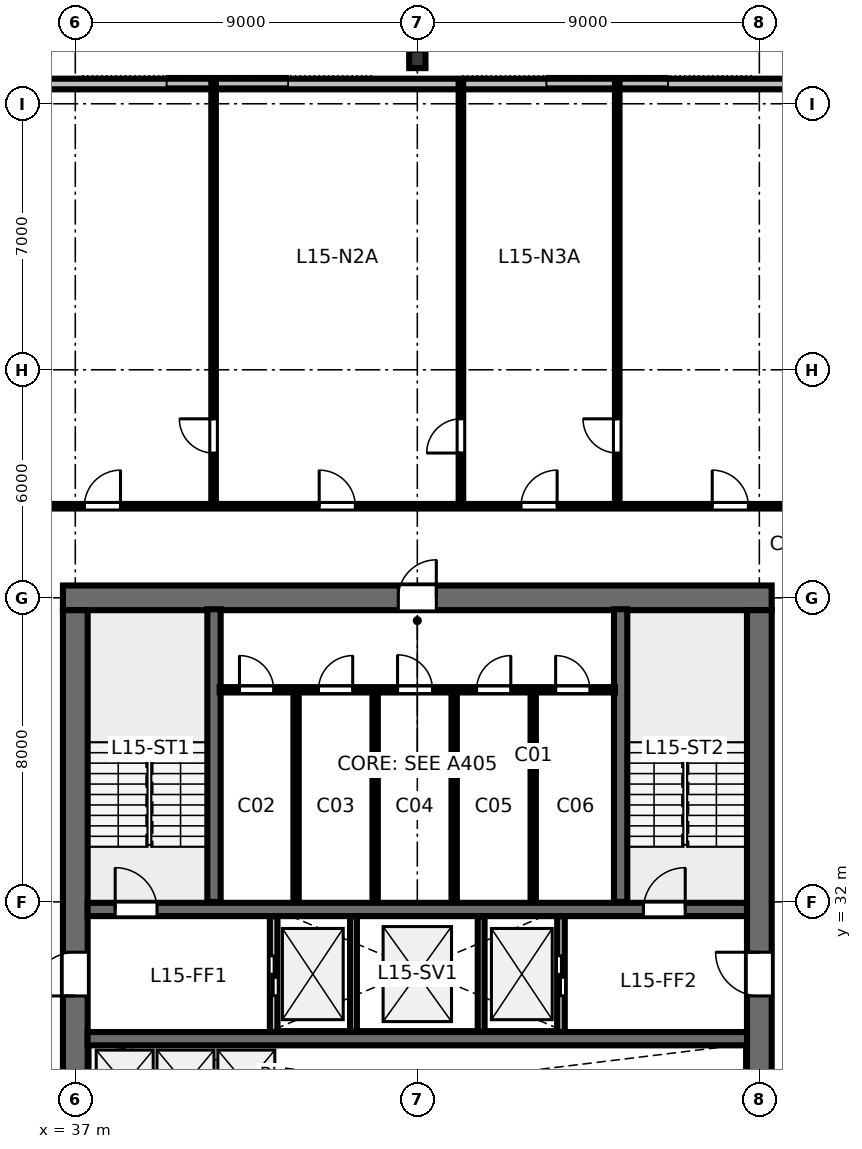
"""IFC4 building model, lengths in metres.
Left out: names, types, materials, properties, quantities, classifications, styles, units other than length and angle.
Written with IfcOpenShell. Run it as: python <this file> out.ifc"""

import sys

from ifc_helpers import new_model, si_unit, direction, frame, frame_2d, origin, origin_2d, place, context, subcontext, project, spatial, rectangle, i_section, extrude, element, fill, save


model = new_model("IFC4")
c1 = context("Model", 3, precision=1e-05, world=origin(), true_north=direction((0.0, 1.0)))
c2 = subcontext(c1, "Body", "Model", "MODEL_VIEW")
j1 = project(units=[si_unit("LENGTHUNIT", "METRE"), si_unit("PLANEANGLEUNIT", "RADIAN")], contexts=[c1])
p1 = place(None, origin())
s1 = spatial("IfcSite", under=j1, at=p1, CompositionType="ELEMENT")
p2 = place(p1, origin())
s2 = spatial("IfcBuilding", under=s1, at=p2, CompositionType="ELEMENT")
p3 = place(p2, frame((0.0, 0.0, 60.4)))
s3 = spatial("IfcBuildingStorey", under=s2, at=p3, CompositionType="ELEMENT", Elevation=60.4)
p4 = place(p3, frame((36.675, 40.0, 0.0), z_axis=(0.0, 0.0, 1.0), x_axis=(1.0, 0.0, 0.0)))
e1 = element("IfcWall", 1, at=p4, inside=s3, PredefinedType="SHEAR", context=c2, shape_type="SweptSolid", body=[
    extrude(rectangle(XDim=18.65, YDim=0.65, at=frame_2d((9.325, 0.0))), origin(), (0.0, 0.0, 1.0), 3.36),
])
p5 = place(p4, frame((8.825, 0.0, 0.0)))
e2 = element("IfcOpeningElement", 2, at=p5, cuts=e1, PredefinedType="OPENING", context=c2, shape_type="SweptSolid", body=[
    extrude(rectangle(XDim=1.0, YDim=2.15, at=frame_2d((0.5, 1.075))), frame((0.0, 0.335, 0.0), z_axis=(0.0, -1.0, 0.0), x_axis=(1.0, 0.0, 0.0)), (0.0, 0.0, 1.0), 0.67),
])
p6 = place(p3, frame((37.0, 24.325, 0.0), z_axis=(0.0, 0.0, 1.0), x_axis=(0.0, 1.0, 0.0)))
e3 = element("IfcWall", 3, at=p6, inside=s3, PredefinedType="SHEAR", context=c2, shape_type="SweptSolid", body=[
    extrude(rectangle(XDim=15.35, YDim=0.65, at=frame_2d((7.675, 0.0))), origin(), (0.0, 0.0, 1.0), 3.36),
])
p7 = place(p6, frame((5.2, 0.0, 0.0)))
e4 = element("IfcOpeningElement", 4, at=p7, cuts=e3, PredefinedType="OPENING", context=c2, shape_type="SweptSolid", body=[
    extrude(rectangle(XDim=1.15, YDim=2.15, at=frame_2d((0.575, 1.075))), frame((0.0, 0.335, 0.0), z_axis=(0.0, -1.0, 0.0), x_axis=(1.0, 0.0, 0.0)), (0.0, 0.0, 1.0), 0.67),
])
p8 = place(p3, frame((55.0, 24.325, 0.0), z_axis=(0.0, 0.0, 1.0), x_axis=(0.0, 1.0, 0.0)))
e5 = element("IfcWall", 5, at=p8, inside=s3, PredefinedType="SHEAR", context=c2, shape_type="SweptSolid", body=[
    extrude(rectangle(XDim=15.35, YDim=0.65, at=frame_2d((7.675, 0.0))), origin(), (0.0, 0.0, 1.0), 3.36),
])
p9 = place(p8, frame((5.2, 0.0, 0.0)))
e6 = element("IfcOpeningElement", 6, at=p9, cuts=e5, PredefinedType="OPENING", context=c2, shape_type="SweptSolid", body=[
    extrude(rectangle(XDim=1.15, YDim=2.15, at=frame_2d((0.575, 1.075))), frame((0.0, 0.335, 0.0), z_axis=(0.0, -1.0, 0.0), x_axis=(1.0, 0.0, 0.0)), (0.0, 0.0, 1.0), 0.67),
])
p10 = place(p3, frame((37.325, 31.8, 0.0), z_axis=(0.0, 0.0, 1.0), x_axis=(1.0, 0.0, 0.0)))
e7 = element("IfcWall", 7, at=p10, inside=s3, PredefinedType="SHEAR", context=c2, shape_type="SweptSolid", body=[
    extrude(rectangle(XDim=17.35, YDim=0.35, at=frame_2d((8.675, 0.0))), origin(), (0.0, 0.0, 1.0), 3.36),
])
p11 = place(p10, frame((0.725, 0.0, 0.0)))
e8 = element("IfcOpeningElement", 8, at=p11, cuts=e7, PredefinedType="OPENING", context=c2, shape_type="SweptSolid", body=[
    extrude(rectangle(XDim=1.1, YDim=2.15, at=frame_2d((0.55, 1.075))), frame((0.0, 0.185, 0.0), z_axis=(0.0, -1.0, 0.0), x_axis=(1.0, 0.0, 0.0)), (0.0, 0.0, 1.0), 0.37),
])
p12 = place(p10, frame((14.625, 0.0, 0.0)))
e9 = element("IfcOpeningElement", 9, at=p12, cuts=e7, PredefinedType="OPENING", context=c2, shape_type="SweptSolid", body=[
    extrude(rectangle(XDim=1.1, YDim=2.15, at=frame_2d((0.55, 1.075))), frame((0.0, 0.185, 0.0), z_axis=(0.0, -1.0, 0.0), x_axis=(1.0, 0.0, 0.0)), (0.0, 0.0, 1.0), 0.37),
])
p13 = place(p3, frame((37.325, 28.4, 0.0), z_axis=(0.0, 0.0, 1.0), x_axis=(1.0, 0.0, 0.0)))
e10 = element("IfcWall", 10, at=p13, inside=s3, PredefinedType="SHEAR", context=c2, shape_type="SweptSolid", body=[
    extrude(rectangle(XDim=17.35, YDim=0.35, at=frame_2d((8.675, 0.0))), origin(), (0.0, 0.0, 1.0), 3.36),
])
p14 = place(p3, frame((46.0, 54.18, 0.0), z_axis=(0.0, 0.0, 1.0), x_axis=(1.0, 0.0, 0.0)))
e11 = element("IfcColumn", 11, at=p14, inside=s3, PredefinedType="COLUMN", context=c2, shape_type="SweptSolid", body=[
    extrude(i_section(OverallWidth=0.428, OverallDepth=0.483, WebThickness=0.051, FlangeThickness=0.082, FilletRadius=0.025, at=origin_2d()), origin(), (0.0, 0.0, 1.0), 3.358),
])
p15 = place(p3, frame((66.89, 53.52, 0.0), z_axis=(0.0, 0.0, 1.0), x_axis=(-1.0, 0.0, 0.0)))
e12 = element("IfcWall", 12, at=p15, inside=s3, PredefinedType="STANDARD", context=c2, shape_type="SweptSolid", body=[
    extrude(rectangle(XDim=41.78, YDim=0.28, at=frame_2d((20.89, 0.0))), origin(), (0.0, 0.0, 1.0), 3.36),
])
for number, where, z_axis, x_axis in (
    (13, (40.65, 32.0, 0.0), (0.0, 0.0, 1.0), (0.0, 1.0, 0.0)),
    (14, (51.35, 32.0, 0.0), (0.0, 0.0, 1.0), (0.0, 1.0, 0.0)),
):
    element("IfcWall", number, at=place(p3, frame(where, z_axis=z_axis, x_axis=x_axis)), inside=s3, PredefinedType="SHEAR", context=c2, shape_type="SweptSolid", body=[
        extrude(rectangle(XDim=7.7, YDim=0.35, at=frame_2d((3.85, 0.0))), origin(), (0.0, 0.0, 1.0), 3.6),
    ])
for number, where, z_axis, x_axis in (
    (15, (42.81, 32.05, 0.0), (0.0, 0.0, 1.0), (0.0, 1.0, 0.0)),
    (16, (44.89, 32.05, 0.0), (0.0, 0.0, 1.0), (0.0, 1.0, 0.0)),
    (17, (46.97, 32.05, 0.0), (0.0, 0.0, 1.0), (0.0, 1.0, 0.0)),
    (18, (49.05, 32.05, 0.0), (0.0, 0.0, 1.0), (0.0, 1.0, 0.0)),
):
    element("IfcWall", number, at=place(p3, frame(where, z_axis=z_axis, x_axis=x_axis)), inside=s3, PredefinedType="PARTITIONING", context=c2, shape_type="SweptSolid", body=[
        extrude(rectangle(XDim=5.5, YDim=0.14, at=frame_2d((2.75, 0.0))), origin(), (0.0, 0.0, 1.0), 3.36),
    ])
p16 = place(p3, frame((40.8, 37.58, 0.0), z_axis=(0.0, 0.0, 1.0), x_axis=(1.0, 0.0, 0.0)))
e19 = element("IfcWall", 19, at=p16, inside=s3, PredefinedType="PARTITIONING", context=c2, shape_type="SweptSolid", body=[
    extrude(rectangle(XDim=10.4, YDim=0.14, at=frame_2d((5.2, 0.0))), origin(), (0.0, 0.0, 1.0), 3.36),
])
p17 = place(p16, frame((0.52, 0.0, 0.0)))
e20 = element("IfcOpeningElement", 20, at=p17, cuts=e19, PredefinedType="OPENING", context=c2, shape_type="SweptSolid", body=[
    extrude(rectangle(XDim=0.9, YDim=2.15, at=frame_2d((0.45, 1.075))), frame((0.0, 0.08, 0.0), z_axis=(0.0, -1.0, 0.0), x_axis=(1.0, 0.0, 0.0)), (0.0, 0.0, 1.0), 0.16),
])
p18 = place(p16, frame((2.6, 0.0, 0.0)))
e21 = element("IfcOpeningElement", 21, at=p18, cuts=e19, PredefinedType="OPENING", context=c2, shape_type="SweptSolid", body=[
    extrude(rectangle(XDim=0.9, YDim=2.15, at=frame_2d((0.45, 1.075))), frame((0.0, 0.08, 0.0), z_axis=(0.0, -1.0, 0.0), x_axis=(1.0, 0.0, 0.0)), (0.0, 0.0, 1.0), 0.16),
])
p19 = place(p16, frame((4.68, 0.0, 0.0)))
e22 = element("IfcOpeningElement", 22, at=p19, cuts=e19, PredefinedType="OPENING", context=c2, shape_type="SweptSolid", body=[
    extrude(rectangle(XDim=0.92, YDim=2.15, at=frame_2d((0.46, 1.075))), frame((0.0, 0.08, 0.0), z_axis=(0.0, -1.0, 0.0), x_axis=(1.0, 0.0, 0.0)), (0.0, 0.0, 1.0), 0.16),
])
p20 = place(p16, frame((6.76, 0.0, 0.0)))
e23 = element("IfcOpeningElement", 23, at=p20, cuts=e19, PredefinedType="OPENING", context=c2, shape_type="SweptSolid", body=[
    extrude(rectangle(XDim=0.9, YDim=2.15, at=frame_2d((0.45, 1.075))), frame((0.0, 0.08, 0.0), z_axis=(0.0, -1.0, 0.0), x_axis=(1.0, 0.0, 0.0)), (0.0, 0.0, 1.0), 0.16),
])
p21 = place(p16, frame((8.84, 0.0, 0.0)))
e24 = element("IfcOpeningElement", 24, at=p21, cuts=e19, PredefinedType="OPENING", context=c2, shape_type="SweptSolid", body=[
    extrude(rectangle(XDim=0.9, YDim=2.15, at=frame_2d((0.45, 1.075))), frame((0.0, 0.08, 0.0), z_axis=(0.0, -1.0, 0.0), x_axis=(1.0, 0.0, 0.0)), (0.0, 0.0, 1.0), 0.16),
])
p22 = place(p3, frame((42.22, 28.58, 0.0), z_axis=(0.0, 0.0, 1.0), x_axis=(0.0, 1.0, 0.0)))
e25 = element("IfcWall", 25, at=p22, inside=s3, PredefinedType="PARTITIONING", context=c2, shape_type="SweptSolid", body=[
    extrude(rectangle(XDim=3.04, YDim=0.2, at=frame_2d((1.52, 0.0))), origin(), (0.0, 0.0, 1.0), 3.36),
])
p23 = place(p22, frame((0.95, 0.0, 0.0)))
e26 = element("IfcOpeningElement", 26, at=p23, cuts=e25, PredefinedType="OPENING", context=c2, shape_type="SweptSolid", body=[
    extrude(rectangle(XDim=1.05, YDim=2.15, at=frame_2d((0.525, 1.075))), frame((0.0, 0.11, 0.0), z_axis=(0.0, -1.0, 0.0), x_axis=(1.0, 0.0, 0.0)), (0.0, 0.0, 1.0), 0.22),
])
p24 = place(p3, frame((49.78, 28.58, 0.0), z_axis=(0.0, 0.0, 1.0), x_axis=(0.0, 1.0, 0.0)))
e27 = element("IfcWall", 27, at=p24, inside=s3, PredefinedType="PARTITIONING", context=c2, shape_type="SweptSolid", body=[
    extrude(rectangle(XDim=3.04, YDim=0.2, at=frame_2d((1.52, 0.0))), origin(), (0.0, 0.0, 1.0), 3.36),
])
p25 = place(p24, frame((0.95, 0.0, 0.0)))
e28 = element("IfcOpeningElement", 28, at=p25, cuts=e27, PredefinedType="OPENING", context=c2, shape_type="SweptSolid", body=[
    extrude(rectangle(XDim=1.05, YDim=2.15, at=frame_2d((0.525, 1.075))), frame((0.0, 0.11, 0.0), z_axis=(0.0, -1.0, 0.0), x_axis=(1.0, 0.0, 0.0)), (0.0, 0.0, 1.0), 0.22),
])
for number, where, z_axis, x_axis in (
    (29, (44.32, 28.58, 0.0), (0.0, 0.0, 1.0), (0.0, 1.0, 0.0)),
    (30, (47.68, 28.58, 0.0), (0.0, 0.0, 1.0), (0.0, 1.0, 0.0)),
):
    element("IfcWall", number, at=place(p3, frame(where, z_axis=z_axis, x_axis=x_axis)), inside=s3, PredefinedType="PARTITIONING", context=c2, shape_type="SweptSolid", body=[
        extrude(rectangle(XDim=3.04, YDim=0.18, at=frame_2d((1.52, 0.0))), origin(), (0.0, 0.0, 1.0), 3.36),
    ])
p26 = place(p3, frame((40.639, 42.41, 0.0), z_axis=(0.0, 0.0, 1.0), x_axis=(0.0, 1.0, 0.0)))
e31 = element("IfcWall", 31, at=p26, inside=s3, PredefinedType="PARTITIONING", context=c2, shape_type="SweptSolid", body=[
    extrude(rectangle(XDim=11.11, YDim=0.12, at=frame_2d((5.555, 0.0))), origin(), (0.0, 0.0, 1.0), 2.64),
])
p27 = place(p26, frame((1.4, 0.0, 0.0)))
e32 = element("IfcOpeningElement", 32, at=p27, cuts=e31, PredefinedType="OPENING", context=c2, shape_type="SweptSolid", body=[
    extrude(rectangle(XDim=0.9, YDim=2.15, at=frame_2d((0.45, 1.075))), frame((0.0, 0.07, 0.0), z_axis=(0.0, -1.0, 0.0), x_axis=(1.0, 0.0, 0.0)), (0.0, 0.0, 1.0), 0.14),
])
p28 = place(p3, frame((47.148, 42.41, 0.0), z_axis=(0.0, 0.0, 1.0), x_axis=(0.0, 1.0, 0.0)))
e33 = element("IfcWall", 33, at=p28, inside=s3, PredefinedType="PARTITIONING", context=c2, shape_type="SweptSolid", body=[
    extrude(rectangle(XDim=11.11, YDim=0.12, at=frame_2d((5.555, 0.0))), origin(), (0.0, 0.0, 1.0), 2.64),
])
p29 = place(p28, frame((1.4, 0.0, 0.0)))
e34 = element("IfcOpeningElement", 34, at=p29, cuts=e33, PredefinedType="OPENING", context=c2, shape_type="SweptSolid", body=[
    extrude(rectangle(XDim=0.9, YDim=2.15, at=frame_2d((0.45, 1.075))), frame((0.0, 0.07, 0.0), z_axis=(0.0, -1.0, 0.0), x_axis=(1.0, 0.0, 0.0)), (0.0, 0.0, 1.0), 0.14),
])
p30 = place(p3, frame((51.261, 42.41, 0.0), z_axis=(0.0, 0.0, 1.0), x_axis=(0.0, 1.0, 0.0)))
e35 = element("IfcWall", 35, at=p30, inside=s3, PredefinedType="PARTITIONING", context=c2, shape_type="SweptSolid", body=[
    extrude(rectangle(XDim=11.11, YDim=0.12, at=frame_2d((5.555, 0.0))), origin(), (0.0, 0.0, 1.0), 2.64),
])
p31 = place(p30, frame((1.4, 0.0, 0.0)))
e36 = element("IfcOpeningElement", 36, at=p31, cuts=e35, PredefinedType="OPENING", context=c2, shape_type="SweptSolid", body=[
    extrude(rectangle(XDim=0.9, YDim=2.15, at=frame_2d((0.45, 1.075))), frame((0.0, 0.07, 0.0), z_axis=(0.0, -1.0, 0.0), x_axis=(1.0, 0.0, 0.0)), (0.0, 0.0, 1.0), 0.14),
])
p32 = place(p3, frame((34.65, 42.41, 0.0), z_axis=(0.0, 0.0, 1.0), x_axis=(1.0, 0.0, 0.0)))
e37 = element("IfcWall", 37, at=p32, inside=s3, PredefinedType="PARTITIONING", context=c2, shape_type="SweptSolid", body=[
    extrude(rectangle(XDim=22.7, YDim=0.12, at=frame_2d((11.35, 0.0))), origin(), (0.0, 0.0, 1.0), 2.64),
])
p33 = place(p32, frame((2.59, 0.0, 0.0)))
e38 = element("IfcOpeningElement", 38, at=p33, cuts=e37, PredefinedType="OPENING", context=c2, shape_type="SweptSolid", body=[
    extrude(rectangle(XDim=0.95, YDim=2.15, at=frame_2d((0.475, 1.075))), frame((0.0, 0.07, 0.0), z_axis=(0.0, -1.0, 0.0), x_axis=(1.0, 0.0, 0.0)), (0.0, 0.0, 1.0), 0.14),
])
p34 = place(p32, frame((8.768, 0.0, 0.0)))
e39 = element("IfcOpeningElement", 39, at=p34, cuts=e37, PredefinedType="OPENING", context=c2, shape_type="SweptSolid", body=[
    extrude(rectangle(XDim=0.95, YDim=2.15, at=frame_2d((0.475, 1.075))), frame((0.0, 0.07, 0.0), z_axis=(0.0, -1.0, 0.0), x_axis=(1.0, 0.0, 0.0)), (0.0, 0.0, 1.0), 0.14),
])
p35 = place(p32, frame((14.079, 0.0, 0.0)))
e40 = element("IfcOpeningElement", 40, at=p35, cuts=e37, PredefinedType="OPENING", context=c2, shape_type="SweptSolid", body=[
    extrude(rectangle(XDim=0.95, YDim=2.15, at=frame_2d((0.475, 1.075))), frame((0.0, 0.07, 0.0), z_axis=(0.0, -1.0, 0.0), x_axis=(1.0, 0.0, 0.0)), (0.0, 0.0, 1.0), 0.14),
])
p36 = place(p32, frame((19.11, 0.0, 0.0)))
e41 = element("IfcOpeningElement", 41, at=p36, cuts=e37, PredefinedType="OPENING", context=c2, shape_type="SweptSolid", body=[
    extrude(rectangle(XDim=0.95, YDim=2.15, at=frame_2d((0.475, 1.075))), frame((0.0, 0.07, 0.0), z_axis=(0.0, -1.0, 0.0), x_axis=(1.0, 0.0, 0.0)), (0.0, 0.0, 1.0), 0.14),
])
p37 = place(p11, origin())
e42 = element("IfcDoor", 42, at=p37, inside=s3, OperationType="SINGLE_SWING_LEFT", PredefinedType="DOOR", context=c2, shape_type="SweptSolid", body=[
    extrude(rectangle(XDim=1.1, YDim=2.15, at=frame_2d((0.55, 1.075))), frame((0.0, 0.025, 0.0), z_axis=(0.0, -1.0, 0.0), x_axis=(1.0, 0.0, 0.0)), (0.0, 0.0, 1.0), 0.05),
])
fill(e8, e42)
p38 = place(p12, origin())
e43 = element("IfcDoor", 43, at=p38, inside=s3, OperationType="SINGLE_SWING_RIGHT", PredefinedType="DOOR", context=c2, shape_type="SweptSolid", body=[
    extrude(rectangle(XDim=1.1, YDim=2.15, at=frame_2d((0.55, 1.075))), frame((0.0, 0.025, 0.0), z_axis=(0.0, -1.0, 0.0), x_axis=(1.0, 0.0, 0.0)), (0.0, 0.0, 1.0), 0.05),
])
fill(e9, e43)
p39 = place(p5, origin())
e44 = element("IfcDoor", 44, at=p39, inside=s3, OperationType="SINGLE_SWING_RIGHT", PredefinedType="DOOR", context=c2, shape_type="SweptSolid", body=[
    extrude(rectangle(XDim=1.0, YDim=2.15, at=frame_2d((0.5, 1.075))), frame((0.0, 0.025, 0.0), z_axis=(0.0, -1.0, 0.0), x_axis=(1.0, 0.0, 0.0)), (0.0, 0.0, 1.0), 0.05),
])
fill(e2, e44)
p40 = place(p7, origin())
e45 = element("IfcDoor", 45, at=p40, inside=s3, OperationType="SINGLE_SWING_LEFT", PredefinedType="DOOR", context=c2, shape_type="SweptSolid", body=[
    extrude(rectangle(XDim=1.15, YDim=2.15, at=frame_2d((0.575, 1.075))), frame((0.0, 0.025, 0.0), z_axis=(0.0, -1.0, 0.0), x_axis=(1.0, 0.0, 0.0)), (0.0, 0.0, 1.0), 0.05),
])
fill(e4, e45)
p41 = place(p9, origin())
e46 = element("IfcDoor", 46, at=p41, inside=s3, OperationType="SINGLE_SWING_RIGHT", PredefinedType="DOOR", context=c2, shape_type="SweptSolid", body=[
    extrude(rectangle(XDim=1.15, YDim=2.15, at=frame_2d((0.575, 1.075))), frame((0.0, 0.025, 0.0), z_axis=(0.0, -1.0, 0.0), x_axis=(1.0, 0.0, 0.0)), (0.0, 0.0, 1.0), 0.05),
])
fill(e6, e46)
p42 = place(p17, origin())
e47 = element("IfcDoor", 47, at=p42, inside=s3, OperationType="SINGLE_SWING_LEFT", PredefinedType="DOOR", context=c2, shape_type="SweptSolid", body=[
    extrude(rectangle(XDim=0.9, YDim=2.15, at=frame_2d((0.45, 1.075))), frame((0.0, 0.025, 0.0), z_axis=(0.0, -1.0, 0.0), x_axis=(1.0, 0.0, 0.0)), (0.0, 0.0, 1.0), 0.05),
])
fill(e20, e47)
p43 = place(p18, origin())
e48 = element("IfcDoor", 48, at=p43, inside=s3, OperationType="SINGLE_SWING_RIGHT", PredefinedType="DOOR", context=c2, shape_type="SweptSolid", body=[
    extrude(rectangle(XDim=0.9, YDim=2.15, at=frame_2d((0.45, 1.075))), frame((0.0, 0.025, 0.0), z_axis=(0.0, -1.0, 0.0), x_axis=(1.0, 0.0, 0.0)), (0.0, 0.0, 1.0), 0.05),
])
fill(e21, e48)
p44 = place(p19, origin())
e49 = element("IfcDoor", 49, at=p44, inside=s3, OperationType="SINGLE_SWING_LEFT", PredefinedType="DOOR", context=c2, shape_type="SweptSolid", body=[
    extrude(rectangle(XDim=0.92, YDim=2.15, at=frame_2d((0.46, 1.075))), frame((0.0, 0.025, 0.0), z_axis=(0.0, -1.0, 0.0), x_axis=(1.0, 0.0, 0.0)), (0.0, 0.0, 1.0), 0.05),
])
fill(e22, e49)
p45 = place(p20, origin())
e50 = element("IfcDoor", 50, at=p45, inside=s3, OperationType="SINGLE_SWING_RIGHT", PredefinedType="DOOR", context=c2, shape_type="SweptSolid", body=[
    extrude(rectangle(XDim=0.9, YDim=2.15, at=frame_2d((0.45, 1.075))), frame((0.0, 0.025, 0.0), z_axis=(0.0, -1.0, 0.0), x_axis=(1.0, 0.0, 0.0)), (0.0, 0.0, 1.0), 0.05),
])
fill(e23, e50)
p46 = place(p21, origin())
e51 = element("IfcDoor", 51, at=p46, inside=s3, OperationType="SINGLE_SWING_LEFT", PredefinedType="DOOR", context=c2, shape_type="SweptSolid", body=[
    extrude(rectangle(XDim=0.9, YDim=2.15, at=frame_2d((0.45, 1.075))), frame((0.0, 0.025, 0.0), z_axis=(0.0, -1.0, 0.0), x_axis=(1.0, 0.0, 0.0)), (0.0, 0.0, 1.0), 0.05),
])
fill(e24, e51)
p47 = place(p23, origin())
e52 = element("IfcDoor", 52, at=p47, inside=s3, OperationType="SLIDING_TO_LEFT", PredefinedType="DOOR", context=c2, shape_type="SweptSolid", body=[
    extrude(rectangle(XDim=1.05, YDim=2.15, at=frame_2d((0.525, 1.075))), frame((0.0, 0.025, 0.0), z_axis=(0.0, -1.0, 0.0), x_axis=(1.0, 0.0, 0.0)), (0.0, 0.0, 1.0), 0.05),
])
fill(e26, e52)
p48 = place(p25, origin())
e53 = element("IfcDoor", 53, at=p48, inside=s3, OperationType="SLIDING_TO_RIGHT", PredefinedType="DOOR", context=c2, shape_type="SweptSolid", body=[
    extrude(rectangle(XDim=1.05, YDim=2.15, at=frame_2d((0.525, 1.075))), frame((0.0, 0.025, 0.0), z_axis=(0.0, -1.0, 0.0), x_axis=(1.0, 0.0, 0.0)), (0.0, 0.0, 1.0), 0.05),
])
fill(e28, e53)
p49 = place(p27, origin())
e54 = element("IfcDoor", 54, at=p49, inside=s3, OperationType="SINGLE_SWING_RIGHT", PredefinedType="DOOR", context=c2, shape_type="SweptSolid", body=[
    extrude(rectangle(XDim=0.9, YDim=2.15, at=frame_2d((0.45, 1.075))), frame((0.0, 0.025, 0.0), z_axis=(0.0, -1.0, 0.0), x_axis=(1.0, 0.0, 0.0)), (0.0, 0.0, 1.0), 0.05),
])
fill(e32, e54)
p50 = place(p29, origin())
e55 = element("IfcDoor", 55, at=p50, inside=s3, OperationType="SINGLE_SWING_LEFT", PredefinedType="DOOR", context=c2, shape_type="SweptSolid", body=[
    extrude(rectangle(XDim=0.9, YDim=2.15, at=frame_2d((0.45, 1.075))), frame((0.0, 0.025, 0.0), z_axis=(0.0, -1.0, 0.0), x_axis=(1.0, 0.0, 0.0)), (0.0, 0.0, 1.0), 0.05),
])
fill(e34, e55)
p51 = place(p31, origin())
e56 = element("IfcDoor", 56, at=p51, inside=s3, OperationType="SINGLE_SWING_RIGHT", PredefinedType="DOOR", context=c2, shape_type="SweptSolid", body=[
    extrude(rectangle(XDim=0.9, YDim=2.15, at=frame_2d((0.45, 1.075))), frame((0.0, 0.025, 0.0), z_axis=(0.0, -1.0, 0.0), x_axis=(1.0, 0.0, 0.0)), (0.0, 0.0, 1.0), 0.05),
])
fill(e36, e56)
p52 = place(p33, origin())
e57 = element("IfcDoor", 57, at=p52, inside=s3, OperationType="SINGLE_SWING_RIGHT", PredefinedType="DOOR", context=c2, shape_type="SweptSolid", body=[
    extrude(rectangle(XDim=0.95, YDim=2.15, at=frame_2d((0.475, 1.075))), frame((0.0, 0.025, 0.0), z_axis=(0.0, -1.0, 0.0), x_axis=(1.0, 0.0, 0.0)), (0.0, 0.0, 1.0), 0.05),
])
fill(e38, e57)
p53 = place(p34, origin())
e58 = element("IfcDoor", 58, at=p53, inside=s3, OperationType="SINGLE_SWING_LEFT", PredefinedType="DOOR", context=c2, shape_type="SweptSolid", body=[
    extrude(rectangle(XDim=0.95, YDim=2.15, at=frame_2d((0.475, 1.075))), frame((0.0, 0.025, 0.0), z_axis=(0.0, -1.0, 0.0), x_axis=(1.0, 0.0, 0.0)), (0.0, 0.0, 1.0), 0.05),
])
fill(e39, e58)
p54 = place(p35, origin())
e59 = element("IfcDoor", 59, at=p54, inside=s3, OperationType="SINGLE_SWING_RIGHT", PredefinedType="DOOR", context=c2, shape_type="SweptSolid", body=[
    extrude(rectangle(XDim=0.95, YDim=2.15, at=frame_2d((0.475, 1.075))), frame((0.0, 0.025, 0.0), z_axis=(0.0, -1.0, 0.0), x_axis=(1.0, 0.0, 0.0)), (0.0, 0.0, 1.0), 0.05),
])
fill(e40, e59)
p55 = place(p36, origin())
e60 = element("IfcDoor", 60, at=p55, inside=s3, OperationType="SINGLE_SWING_LEFT", PredefinedType="DOOR", context=c2, shape_type="SweptSolid", body=[
    extrude(rectangle(XDim=0.95, YDim=2.15, at=frame_2d((0.475, 1.075))), frame((0.0, 0.025, 0.0), z_axis=(0.0, -1.0, 0.0), x_axis=(1.0, 0.0, 0.0)), (0.0, 0.0, 1.0), 0.05),
])
fill(e41, e60)
save(model, sys.argv[1])
